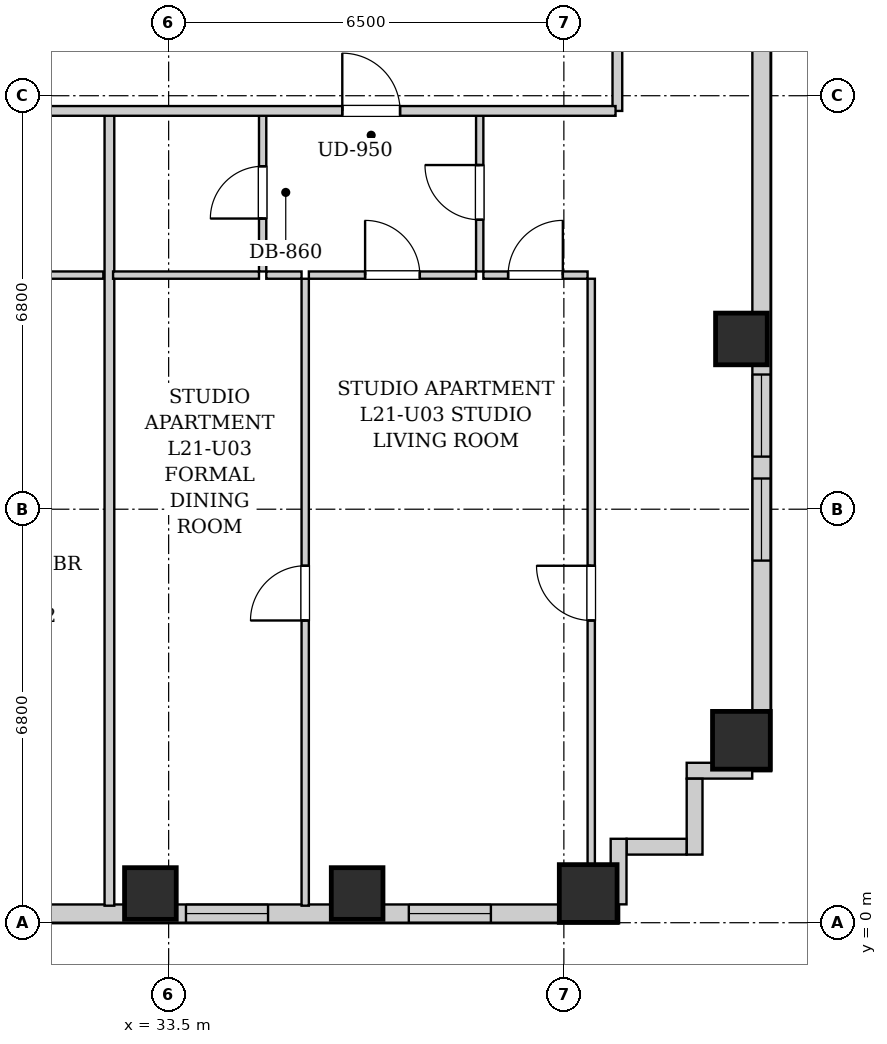
"""IFC4 building model, lengths in metres.
Left out: names, types, materials, properties, quantities, classifications, styles, units other than length and angle.
Written with IfcOpenShell. Run it as: python <this file> out.ifc"""

import sys

from ifc_helpers import new_model, si_unit, direction, frame, frame_2d, origin, origin_2d, place, context, subcontext, project, spatial, rectangle, extrude, element, fill, save


model = new_model("IFC4")
c1 = context("Model", 3, precision=1e-05, world=origin(), true_north=direction((0.0, 1.0)))
c2 = subcontext(c1, "Body", "Model", "MODEL_VIEW")
j1 = project(units=[si_unit("LENGTHUNIT", "METRE"), si_unit("PLANEANGLEUNIT", "RADIAN")], contexts=[c1])
p1 = place(None, origin())
s1 = spatial("IfcSite", under=j1, at=p1, CompositionType="ELEMENT")
p2 = place(p1, origin())
s2 = spatial("IfcBuilding", under=s1, at=p2, CompositionType="ELEMENT")
p3 = place(p2, frame((0.0, 0.0, 78.3)))
s3 = spatial("IfcBuildingStorey", under=s2, at=p3, CompositionType="ELEMENT", Elevation=78.3)
for number, where, z_axis, x_axis in (
    (1, (33.2, 0.48, 0.0), (0.0, 0.0, 1.0), (1.0, 0.0, 0.0)),
    (2, (36.6, 0.48, 0.0), (0.0, 0.0, 1.0), (1.0, 0.0, 0.0)),
):
    element("IfcColumn", number, at=place(p3, frame(where, z_axis=z_axis, x_axis=x_axis)), inside=s3, PredefinedType="COLUMN", context=c2, shape_type="SweptSolid", body=[
        extrude(rectangle(XDim=0.85, YDim=0.85, at=origin_2d()), origin(), (0.0, 0.0, 1.0), 3.2),
    ])
for number, where, z_axis, x_axis in (
    (3, (40.4, 0.48, 0.0), (0.0, 0.0, 1.0), (1.0, 0.0, 0.0)),
    (4, (42.92, 3.0, 0.0), (0.0, 0.0, 1.0), (1.0, 0.0, 0.0)),
):
    element("IfcColumn", number, at=place(p3, frame(where, z_axis=z_axis, x_axis=x_axis)), inside=s3, PredefinedType="COLUMN", context=c2, shape_type="SweptSolid", body=[
        extrude(rectangle(XDim=0.95, YDim=0.95, at=origin_2d()), origin(), (0.0, 0.0, 1.0), 3.2),
    ])
p4 = place(p3, frame((42.92, 9.6, 0.0), z_axis=(0.0, 0.0, 1.0), x_axis=(1.0, 0.0, 0.0)))
e5 = element("IfcColumn", 5, at=p4, inside=s3, PredefinedType="COLUMN", context=c2, shape_type="SweptSolid", body=[
    extrude(rectangle(XDim=0.85, YDim=0.85, at=origin_2d()), origin(), (0.0, 0.0, 1.0), 3.2),
])
p5 = place(p3, frame((43.25, 40.8, 0.0), z_axis=(0.0, 0.0, 1.0), x_axis=(0.0, -1.0, 0.0)))
e6 = element("IfcWall", 6, at=p5, inside=s3, PredefinedType="SOLIDWALL", context=c2, shape_type="SweptSolid", body=[
    extrude(rectangle(XDim=38.3, YDim=0.3, at=frame_2d((19.15, 0.0))), origin(), (0.0, 0.0, 1.0), 2.94),
])
p6 = place(p5, frame((33.495, 0.0, 0.55)))
e7 = element("IfcOpeningElement", 7, at=p6, cuts=e6, PredefinedType="OPENING", context=c2, shape_type="SweptSolid", body=[
    extrude(rectangle(XDim=1.35, YDim=1.2, at=frame_2d((0.675, 0.6))), frame((0.0, 0.16, 0.0), z_axis=(0.0, -1.0, 0.0), x_axis=(1.0, 0.0, 0.0)), (0.0, 0.0, 1.0), 0.32),
])
p7 = place(p5, frame((31.785, 0.0, 0.55)))
e8 = element("IfcOpeningElement", 8, at=p7, cuts=e6, PredefinedType="OPENING", context=c2, shape_type="SweptSolid", body=[
    extrude(rectangle(XDim=1.35, YDim=1.2, at=frame_2d((0.675, 0.6))), frame((0.0, 0.16, 0.0), z_axis=(0.0, -1.0, 0.0), x_axis=(1.0, 0.0, 0.0)), (0.0, 0.0, 1.0), 0.32),
])
p8 = place(p5, frame((21.93, 0.0, 0.55)))
e9 = element("IfcOpeningElement", 9, at=p8, cuts=e6, PredefinedType="OPENING", context=c2, shape_type="SweptSolid", body=[
    extrude(rectangle(XDim=1.35, YDim=1.2, at=frame_2d((0.675, 0.6))), frame((0.0, 0.16, 0.0), z_axis=(0.0, -1.0, 0.0), x_axis=(1.0, 0.0, 0.0)), (0.0, 0.0, 1.0), 0.32),
])
p9 = place(p5, frame((23.54, 0.0, 0.55)))
e10 = element("IfcOpeningElement", 10, at=p9, cuts=e6, PredefinedType="OPENING", context=c2, shape_type="SweptSolid", body=[
    extrude(rectangle(XDim=1.35, YDim=1.2, at=frame_2d((0.675, 0.6))), frame((0.0, 0.16, 0.0), z_axis=(0.0, -1.0, 0.0), x_axis=(1.0, 0.0, 0.0)), (0.0, 0.0, 1.0), 0.32),
])
p10 = place(p5, frame((14.95, 0.0, 0.55)))
e11 = element("IfcOpeningElement", 11, at=p10, cuts=e6, PredefinedType="OPENING", context=c2, shape_type="SweptSolid", body=[
    extrude(rectangle(XDim=1.35, YDim=1.2, at=frame_2d((0.675, 0.6))), frame((0.0, 0.16, 0.0), z_axis=(0.0, -1.0, 0.0), x_axis=(1.0, 0.0, 0.0)), (0.0, 0.0, 1.0), 0.32),
])
p11 = place(p5, frame((12.385, 0.0, 0.55)))
e12 = element("IfcOpeningElement", 12, at=p11, cuts=e6, PredefinedType="OPENING", context=c2, shape_type="SweptSolid", body=[
    extrude(rectangle(XDim=1.35, YDim=1.2, at=frame_2d((0.675, 0.6))), frame((0.0, 0.16, 0.0), z_axis=(0.0, -1.0, 0.0), x_axis=(1.0, 0.0, 0.0)), (0.0, 0.0, 1.0), 0.32),
])
p12 = place(p3, frame((40.9, 0.15, 0.0), z_axis=(0.0, 0.0, 1.0), x_axis=(-1.0, 0.0, 0.0)))
e13 = element("IfcWall", 13, at=p12, inside=s3, PredefinedType="SOLIDWALL", context=c2, shape_type="SweptSolid", body=[
    extrude(rectangle(XDim=23.7, YDim=0.3, at=frame_2d((11.85, 0.0))), origin(), (0.0, 0.0, 1.0), 2.94),
])
p13 = place(p12, frame((20.625, 0.0, 0.55)))
e14 = element("IfcOpeningElement", 14, at=p13, cuts=e13, PredefinedType="OPENING", context=c2, shape_type="SweptSolid", body=[
    extrude(rectangle(XDim=1.35, YDim=1.2, at=frame_2d((0.675, 0.6))), frame((0.0, 0.16, 0.0), z_axis=(0.0, -1.0, 0.0), x_axis=(1.0, 0.0, 0.0)), (0.0, 0.0, 1.0), 0.32),
])
p14 = place(p12, frame((12.55, 0.0, 0.55)))
e15 = element("IfcOpeningElement", 15, at=p14, cuts=e13, PredefinedType="OPENING", context=c2, shape_type="SweptSolid", body=[
    extrude(rectangle(XDim=0.85, YDim=1.2, at=frame_2d((0.425, 0.6))), frame((0.0, 0.16, 0.0), z_axis=(0.0, -1.0, 0.0), x_axis=(1.0, 0.0, 0.0)), (0.0, 0.0, 1.0), 0.32),
])
p15 = place(p12, frame((9.6, 0.0, 0.55)))
e16 = element("IfcOpeningElement", 16, at=p15, cuts=e13, PredefinedType="OPENING", context=c2, shape_type="SweptSolid", body=[
    extrude(rectangle(XDim=1.35, YDim=1.2, at=frame_2d((0.675, 0.6))), frame((0.0, 0.16, 0.0), z_axis=(0.0, -1.0, 0.0), x_axis=(1.0, 0.0, 0.0)), (0.0, 0.0, 1.0), 0.32),
])
p16 = place(p12, frame((5.765, 0.0, 0.55)))
e17 = element("IfcOpeningElement", 17, at=p16, cuts=e13, PredefinedType="OPENING", context=c2, shape_type="SweptSolid", body=[
    extrude(rectangle(XDim=1.35, YDim=1.2, at=frame_2d((0.675, 0.6))), frame((0.0, 0.16, 0.0), z_axis=(0.0, -1.0, 0.0), x_axis=(1.0, 0.0, 0.0)), (0.0, 0.0, 1.0), 0.32),
])
p17 = place(p12, frame((2.1, 0.0, 0.55)))
e18 = element("IfcOpeningElement", 18, at=p17, cuts=e13, PredefinedType="OPENING", context=c2, shape_type="SweptSolid", body=[
    extrude(rectangle(XDim=1.35, YDim=1.2, at=frame_2d((0.675, 0.6))), frame((0.0, 0.16, 0.0), z_axis=(0.0, -1.0, 0.0), x_axis=(1.0, 0.0, 0.0)), (0.0, 0.0, 1.0), 0.32),
])
p18 = place(p3, frame((43.098, 2.5, 0.0), z_axis=(0.0, 0.0, 1.0), x_axis=(-1.0, 0.0, 0.0)))
e19 = element("IfcWall", 19, at=p18, inside=s3, PredefinedType="SOLIDWALL", context=c2, shape_type="SweptSolid", body=[
    extrude(rectangle(XDim=1.078, YDim=0.26, at=frame_2d((0.539, 0.0))), origin(), (0.0, 0.0, 1.0), 2.94),
])
p19 = place(p3, frame((42.15, 2.368, 0.0), z_axis=(0.0, 0.0, 1.0), x_axis=(0.0, -1.0, 0.0)))
e20 = element("IfcWall", 20, at=p19, inside=s3, PredefinedType="SOLIDWALL", context=c2, shape_type="SweptSolid", body=[
    extrude(rectangle(XDim=1.248, YDim=0.26, at=frame_2d((0.624, 0.0))), origin(), (0.0, 0.0, 1.0), 2.94),
])
p20 = place(p3, frame((42.018, 1.25, 0.0), z_axis=(0.0, 0.0, 1.0), x_axis=(-1.0, 0.0, 0.0)))
e21 = element("IfcWall", 21, at=p20, inside=s3, PredefinedType="SOLIDWALL", context=c2, shape_type="SweptSolid", body=[
    extrude(rectangle(XDim=0.986, YDim=0.26, at=frame_2d((0.493, 0.0))), origin(), (0.0, 0.0, 1.0), 2.94),
])
p21 = place(p3, frame((40.9, 1.38, 0.0), z_axis=(0.0, 0.0, 1.0), x_axis=(0.0, -1.0, 0.0)))
e22 = element("IfcWall", 22, at=p21, inside=s3, PredefinedType="SOLIDWALL", context=c2, shape_type="SweptSolid", body=[
    extrude(rectangle(XDim=1.078, YDim=0.26, at=frame_2d((0.539, 0.0))), origin(), (0.0, 0.0, 1.0), 2.94),
])
p22 = place(p3, frame((40.88, 13.35, 0.0), z_axis=(0.0, 0.0, 1.0), x_axis=(0.0, 1.0, 0.0)))
e23 = element("IfcWall", 23, at=p22, inside=s3, PredefinedType="PARTITIONING", context=c2, shape_type="SweptSolid", body=[
    extrude(rectangle(XDim=1.74, YDim=0.16, at=frame_2d((0.87, 0.0))), origin(), (0.0, 0.0, 1.0), 2.94),
])
p23 = place(p3, frame((28.798, 10.65, 0.0), z_axis=(0.0, 0.0, 1.0), x_axis=(1.0, 0.0, 0.0)))
e24 = element("IfcWall", 24, at=p23, inside=s3, PredefinedType="PARTITIONING", context=c2, shape_type="SweptSolid", body=[
    extrude(rectangle(XDim=3.628, YDim=0.12, at=frame_2d((1.814, 0.0))), origin(), (0.0, 0.0, 1.0), 2.94),
])
p24 = place(p23, frame((1.364, 0.0, 0.0)))
e25 = element("IfcOpeningElement", 25, at=p24, cuts=e24, PredefinedType="OPENING", context=c2, shape_type="SweptSolid", body=[
    extrude(rectangle(XDim=0.9, YDim=2.05, at=frame_2d((0.45, 1.025))), frame((0.0, 0.07, 0.0), z_axis=(0.0, -1.0, 0.0), x_axis=(1.0, 0.0, 0.0)), (0.0, 0.0, 1.0), 0.14),
])
p25 = place(p3, frame((32.526, 0.28, 0.0), z_axis=(0.0, 0.0, 1.0), x_axis=(0.0, 1.0, 0.0)))
e26 = element("IfcWall", 26, at=p25, inside=s3, PredefinedType="PARTITIONING", context=c2, shape_type="SweptSolid", body=[
    extrude(rectangle(XDim=13.03, YDim=0.16, at=frame_2d((6.515, 0.0))), origin(), (0.0, 0.0, 1.0), 2.94),
])
p26 = place(p3, frame((35.046, 10.71, 0.0), z_axis=(0.0, 0.0, 1.0), x_axis=(0.0, 1.0, 0.0)))
e27 = element("IfcWall", 27, at=p26, inside=s3, PredefinedType="PARTITIONING", context=c2, shape_type="SweptSolid", body=[
    extrude(rectangle(XDim=2.6, YDim=0.12, at=frame_2d((1.3, 0.0))), origin(), (0.0, 0.0, 1.0), 2.94),
])
p27 = place(p26, frame((0.87, 0.0, 0.0)))
e28 = element("IfcOpeningElement", 28, at=p27, cuts=e27, PredefinedType="OPENING", context=c2, shape_type="SweptSolid", body=[
    extrude(rectangle(XDim=0.86, YDim=2.05, at=frame_2d((0.43, 1.025))), frame((0.0, 0.07, 0.0), z_axis=(0.0, -1.0, 0.0), x_axis=(1.0, 0.0, 0.0)), (0.0, 0.0, 1.0), 0.14),
])
p28 = place(p3, frame((32.586, 10.65, 0.0), z_axis=(0.0, 0.0, 1.0), x_axis=(1.0, 0.0, 0.0)))
e29 = element("IfcWall", 29, at=p28, inside=s3, PredefinedType="PARTITIONING", context=c2, shape_type="SweptSolid", body=[
    extrude(rectangle(XDim=2.4, YDim=0.12, at=frame_2d((1.2, 0.0))), origin(), (0.0, 0.0, 1.0), 2.94),
])
p29 = place(p3, frame((38.616, 10.71, 0.0), z_axis=(0.0, 0.0, 1.0), x_axis=(0.0, 1.0, 0.0)))
e30 = element("IfcWall", 30, at=p29, inside=s3, PredefinedType="PARTITIONING", context=c2, shape_type="SweptSolid", body=[
    extrude(rectangle(XDim=2.6, YDim=0.12, at=frame_2d((1.3, 0.0))), origin(), (0.0, 0.0, 1.0), 2.94),
])
p30 = place(p29, frame((0.85, 0.0, 0.0)))
e31 = element("IfcOpeningElement", 31, at=p30, cuts=e30, PredefinedType="OPENING", context=c2, shape_type="SweptSolid", body=[
    extrude(rectangle(XDim=0.9, YDim=2.05, at=frame_2d((0.45, 1.025))), frame((0.0, 0.07, 0.0), z_axis=(0.0, -1.0, 0.0), x_axis=(1.0, 0.0, 0.0)), (0.0, 0.0, 1.0), 0.14),
])
p31 = place(p3, frame((35.106, 10.65, 0.0), z_axis=(0.0, 0.0, 1.0), x_axis=(1.0, 0.0, 0.0)))
e32 = element("IfcWall", 32, at=p31, inside=s3, PredefinedType="PARTITIONING", context=c2, shape_type="SweptSolid", body=[
    extrude(rectangle(XDim=0.58, YDim=0.12, at=frame_2d((0.29, 0.0))), origin(), (0.0, 0.0, 1.0), 2.94),
])
p32 = place(p3, frame((35.806, 10.65, 0.0), z_axis=(0.0, 0.0, 1.0), x_axis=(1.0, 0.0, 0.0)))
e33 = element("IfcWall", 33, at=p32, inside=s3, PredefinedType="PARTITIONING", context=c2, shape_type="SweptSolid", body=[
    extrude(rectangle(XDim=2.75, YDim=0.12, at=frame_2d((1.375, 0.0))), origin(), (0.0, 0.0, 1.0), 2.94),
])
p33 = place(p32, frame((0.925, 0.0, 0.0)))
e34 = element("IfcOpeningElement", 34, at=p33, cuts=e33, PredefinedType="OPENING", context=c2, shape_type="SweptSolid", body=[
    extrude(rectangle(XDim=0.9, YDim=2.05, at=frame_2d((0.45, 1.025))), frame((0.0, 0.07, 0.0), z_axis=(0.0, -1.0, 0.0), x_axis=(1.0, 0.0, 0.0)), (0.0, 0.0, 1.0), 0.14),
])
p34 = place(p3, frame((38.676, 10.65, 0.0), z_axis=(0.0, 0.0, 1.0), x_axis=(1.0, 0.0, 0.0)))
e35 = element("IfcWall", 35, at=p34, inside=s3, PredefinedType="PARTITIONING", context=c2, shape_type="SweptSolid", body=[
    extrude(rectangle(XDim=1.714, YDim=0.12, at=frame_2d((0.857, 0.0))), origin(), (0.0, 0.0, 1.0), 2.94),
])
p35 = place(p34, frame((0.407, 0.0, 0.0)))
e36 = element("IfcOpeningElement", 36, at=p35, cuts=e35, PredefinedType="OPENING", context=c2, shape_type="SweptSolid", body=[
    extrude(rectangle(XDim=0.9, YDim=2.05, at=frame_2d((0.45, 1.025))), frame((0.0, 0.07, 0.0), z_axis=(0.0, -1.0, 0.0), x_axis=(1.0, 0.0, 0.0)), (0.0, 0.0, 1.0), 0.14),
])
p36 = place(p3, frame((35.746, 0.28, 0.0), z_axis=(0.0, 0.0, 1.0), x_axis=(0.0, 1.0, 0.0)))
e37 = element("IfcWall", 37, at=p36, inside=s3, PredefinedType="PARTITIONING", context=c2, shape_type="SweptSolid", body=[
    extrude(rectangle(XDim=10.31, YDim=0.12, at=frame_2d((5.155, 0.0))), origin(), (0.0, 0.0, 1.0), 2.94),
])
p37 = place(p36, frame((4.69, 0.0, 0.0)))
e38 = element("IfcOpeningElement", 38, at=p37, cuts=e37, PredefinedType="OPENING", context=c2, shape_type="SweptSolid", body=[
    extrude(rectangle(XDim=0.9, YDim=2.05, at=frame_2d((0.45, 1.025))), frame((0.0, 0.07, 0.0), z_axis=(0.0, -1.0, 0.0), x_axis=(1.0, 0.0, 0.0)), (0.0, 0.0, 1.0), 0.14),
])
p38 = place(p3, frame((40.45, 0.28, 0.0), z_axis=(0.0, 0.0, 1.0), x_axis=(0.0, 1.0, 0.0)))
e39 = element("IfcWall", 39, at=p38, inside=s3, PredefinedType="PARTITIONING", context=c2, shape_type="SweptSolid", body=[
    extrude(rectangle(XDim=10.31, YDim=0.12, at=frame_2d((5.155, 0.0))), origin(), (0.0, 0.0, 1.0), 2.94),
])
p39 = place(p38, frame((4.69, 0.0, 0.0)))
e40 = element("IfcOpeningElement", 40, at=p39, cuts=e39, PredefinedType="OPENING", context=c2, shape_type="SweptSolid", body=[
    extrude(rectangle(XDim=0.9, YDim=2.05, at=frame_2d((0.45, 1.025))), frame((0.0, 0.07, 0.0), z_axis=(0.0, -1.0, 0.0), x_axis=(1.0, 0.0, 0.0)), (0.0, 0.0, 1.0), 0.14),
])
p40 = place(p3, frame((10.05, 13.35, 0.0), z_axis=(0.0, 0.0, 1.0), x_axis=(1.0, 0.0, 0.0)))
e41 = element("IfcWall", 41, at=p40, inside=s3, PredefinedType="PARTITIONING", context=c2, shape_type="SweptSolid", body=[
    extrude(rectangle(XDim=30.8, YDim=0.16, at=frame_2d((15.4, 0.0))), origin(), (0.0, 0.0, 1.0), 2.94),
])
p41 = place(p40, frame((2.893, 0.0, 0.0)))
e42 = element("IfcOpeningElement", 42, at=p41, cuts=e41, PredefinedType="OPENING", context=c2, shape_type="SweptSolid", body=[
    extrude(rectangle(XDim=0.95, YDim=2.1, at=frame_2d((0.475, 1.05))), frame((0.0, 0.09, 0.0), z_axis=(0.0, -1.0, 0.0), x_axis=(1.0, 0.0, 0.0)), (0.0, 0.0, 1.0), 0.18),
])
p42 = place(p40, frame((9.161, 0.0, 0.0)))
e43 = element("IfcOpeningElement", 43, at=p42, cuts=e41, PredefinedType="OPENING", context=c2, shape_type="SweptSolid", body=[
    extrude(rectangle(XDim=0.95, YDim=2.1, at=frame_2d((0.475, 1.05))), frame((0.0, 0.09, 0.0), z_axis=(0.0, -1.0, 0.0), x_axis=(1.0, 0.0, 0.0)), (0.0, 0.0, 1.0), 0.18),
])
p43 = place(p40, frame((26.306, 0.0, 0.0)))
e44 = element("IfcOpeningElement", 44, at=p43, cuts=e41, PredefinedType="OPENING", context=c2, shape_type="SweptSolid", body=[
    extrude(rectangle(XDim=0.95, YDim=2.1, at=frame_2d((0.475, 1.05))), frame((0.0, 0.09, 0.0), z_axis=(0.0, -1.0, 0.0), x_axis=(1.0, 0.0, 0.0)), (0.0, 0.0, 1.0), 0.18),
])
p44 = place(p27, origin())
e45 = element("IfcDoor", 45, at=p44, inside=s3, OperationType="SINGLE_SWING_LEFT", PredefinedType="DOOR", context=c2, shape_type="SweptSolid", body=[
    extrude(rectangle(XDim=0.86, YDim=2.05, at=frame_2d((0.43, 1.025))), frame((0.0, 0.025, 0.0), z_axis=(0.0, -1.0, 0.0), x_axis=(1.0, 0.0, 0.0)), (0.0, 0.0, 1.0), 0.05),
])
fill(e28, e45)
p45 = place(p30, origin())
e46 = element("IfcDoor", 46, at=p45, inside=s3, OperationType="SINGLE_SWING_RIGHT", PredefinedType="DOOR", context=c2, shape_type="SweptSolid", body=[
    extrude(rectangle(XDim=0.9, YDim=2.05, at=frame_2d((0.45, 1.025))), frame((0.0, 0.025, 0.0), z_axis=(0.0, -1.0, 0.0), x_axis=(1.0, 0.0, 0.0)), (0.0, 0.0, 1.0), 0.05),
])
fill(e31, e46)
p46 = place(p33, origin())
e47 = element("IfcDoor", 47, at=p46, inside=s3, OperationType="SINGLE_SWING_LEFT", PredefinedType="DOOR", context=c2, shape_type="SweptSolid", body=[
    extrude(rectangle(XDim=0.9, YDim=2.05, at=frame_2d((0.45, 1.025))), frame((0.0, 0.025, 0.0), z_axis=(0.0, -1.0, 0.0), x_axis=(1.0, 0.0, 0.0)), (0.0, 0.0, 1.0), 0.05),
])
fill(e34, e47)
p47 = place(p35, origin())
e48 = element("IfcDoor", 48, at=p47, inside=s3, OperationType="SINGLE_SWING_RIGHT", PredefinedType="DOOR", context=c2, shape_type="SweptSolid", body=[
    extrude(rectangle(XDim=0.9, YDim=2.05, at=frame_2d((0.45, 1.025))), frame((0.0, 0.025, 0.0), z_axis=(0.0, -1.0, 0.0), x_axis=(1.0, 0.0, 0.0)), (0.0, 0.0, 1.0), 0.05),
])
fill(e36, e48)
p48 = place(p37, origin())
e49 = element("IfcDoor", 49, at=p48, inside=s3, OperationType="SINGLE_SWING_LEFT", PredefinedType="DOOR", context=c2, shape_type="SweptSolid", body=[
    extrude(rectangle(XDim=0.9, YDim=2.05, at=frame_2d((0.45, 1.025))), frame((0.0, 0.025, 0.0), z_axis=(0.0, -1.0, 0.0), x_axis=(1.0, 0.0, 0.0)), (0.0, 0.0, 1.0), 0.05),
])
fill(e38, e49)
p49 = place(p39, origin())
e50 = element("IfcDoor", 50, at=p49, inside=s3, OperationType="SINGLE_SWING_RIGHT", PredefinedType="DOOR", context=c2, shape_type="SweptSolid", body=[
    extrude(rectangle(XDim=0.9, YDim=2.05, at=frame_2d((0.45, 1.025))), frame((0.0, 0.025, 0.0), z_axis=(0.0, -1.0, 0.0), x_axis=(1.0, 0.0, 0.0)), (0.0, 0.0, 1.0), 0.05),
])
fill(e40, e50)
p50 = place(p43, origin())
e51 = element("IfcDoor", 51, at=p50, inside=s3, OperationType="SINGLE_SWING_LEFT", PredefinedType="DOOR", context=c2, shape_type="SweptSolid", body=[
    extrude(rectangle(XDim=0.95, YDim=2.1, at=frame_2d((0.475, 1.05))), frame((0.0, 0.025, 0.0), z_axis=(0.0, -1.0, 0.0), x_axis=(1.0, 0.0, 0.0)), (0.0, 0.0, 1.0), 0.05),
])
fill(e44, e51)
p51 = place(p16, origin())
e52 = element("IfcWindow", 52, at=p51, inside=s3, PartitioningType="SINGLE_PANEL", PredefinedType="WINDOW", context=c2, shape_type="SweptSolid", body=[
    extrude(rectangle(XDim=1.35, YDim=1.2, at=frame_2d((0.675, 0.6))), frame((0.0, 0.03, 0.0), z_axis=(0.0, -1.0, 0.0), x_axis=(1.0, 0.0, 0.0)), (0.0, 0.0, 1.0), 0.06),
])
fill(e17, e52)
p52 = place(p17, origin())
e53 = element("IfcWindow", 53, at=p52, inside=s3, PartitioningType="SINGLE_PANEL", PredefinedType="WINDOW", context=c2, shape_type="SweptSolid", body=[
    extrude(rectangle(XDim=1.35, YDim=1.2, at=frame_2d((0.675, 0.6))), frame((0.0, 0.03, 0.0), z_axis=(0.0, -1.0, 0.0), x_axis=(1.0, 0.0, 0.0)), (0.0, 0.0, 1.0), 0.06),
])
fill(e18, e53)
p53 = place(p6, origin())
e54 = element("IfcWindow", 54, at=p53, inside=s3, PartitioningType="SINGLE_PANEL", PredefinedType="WINDOW", context=c2, shape_type="SweptSolid", body=[
    extrude(rectangle(XDim=1.35, YDim=1.2, at=frame_2d((0.675, 0.6))), frame((0.0, 0.03, 0.0), z_axis=(0.0, -1.0, 0.0), x_axis=(1.0, 0.0, 0.0)), (0.0, 0.0, 1.0), 0.06),
])
fill(e7, e54)
p54 = place(p7, origin())
e55 = element("IfcWindow", 55, at=p54, inside=s3, PartitioningType="SINGLE_PANEL", PredefinedType="WINDOW", context=c2, shape_type="SweptSolid", body=[
    extrude(rectangle(XDim=1.35, YDim=1.2, at=frame_2d((0.675, 0.6))), frame((0.0, 0.03, 0.0), z_axis=(0.0, -1.0, 0.0), x_axis=(1.0, 0.0, 0.0)), (0.0, 0.0, 1.0), 0.06),
])
fill(e8, e55)
save(model, sys.argv[1])
